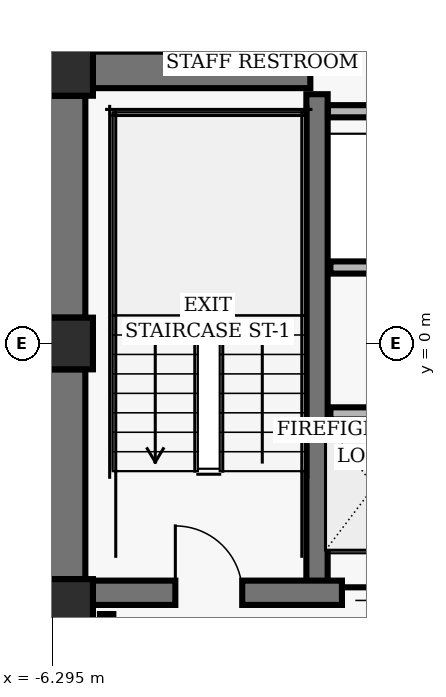
"""IFC4 building model, lengths in metres.
Left out: names, types, materials, properties, quantities, classifications, styles, units other than length and angle.
Written with IfcOpenShell. Run it as: python <this file> out.ifc"""

import sys

from ifc_helpers import new_model, si_unit, direction, frame, frame_2d, origin, origin_2d, place, context, subcontext, project, spatial, rectangle, hollow_rectangle, extrude, element, fill, save


model = new_model("IFC4")
c1 = context("Model", 3, precision=1e-05, world=origin(), true_north=direction((0.0, 1.0)))
c2 = subcontext(c1, "Body", "Model", "MODEL_VIEW")
j1 = project(units=[si_unit("LENGTHUNIT", "METRE"), si_unit("PLANEANGLEUNIT", "RADIAN")], contexts=[c1])
p1 = place(None, origin())
s1 = spatial("IfcSite", under=j1, at=p1, CompositionType="ELEMENT")
p2 = place(p1, origin())
s2 = spatial("IfcBuilding", under=s1, at=p2, CompositionType="ELEMENT")
p3 = place(p2, frame((0.0, 0.0, 116.8)))
s3 = spatial("IfcBuildingStorey", under=s2, at=p3, CompositionType="ELEMENT", Elevation=116.8)
for number, where, z_axis, x_axis in (
    (1, (-6.05, 4.5, 0.0), (0.0, 0.0, 1.0), (1.0, 0.0, 0.0)),
    (2, (-6.05, 0.0, 0.0), (0.0, 0.0, 1.0), (1.0, 0.0, 0.0)),
    (3, (-6.05, -4.3, 0.0), (0.0, 0.0, 1.0), (1.0, 0.0, 0.0)),
):
    element("IfcColumn", number, at=place(p3, frame(where, z_axis=z_axis, x_axis=x_axis)), inside=s3, PredefinedType="COLUMN", context=c2, shape_type="SweptSolid", body=[
        extrude(hollow_rectangle(XDim=0.85, YDim=0.85, WallThickness=0.055, InnerFilletRadius=0.02, OuterFilletRadius=0.04, at=origin_2d()), origin(), (0.0, 0.0, 1.0), 3.04),
    ])
p4 = place(p3, frame((-6.05, 0.425, 0.0), z_axis=(0.0, 0.0, 1.0), x_axis=(0.0, 1.0, 0.0)))
e4 = element("IfcWall", 4, at=p4, inside=s3, PredefinedType="SHEAR", context=c2, shape_type="SweptSolid", body=[
    extrude(rectangle(XDim=3.65, YDim=0.6, at=frame_2d((1.825, 0.0))), origin(), (0.0, 0.0, 1.0), 2.788),
])
p5 = place(p3, frame((-6.05, -3.875, 0.0), z_axis=(0.0, 0.0, 1.0), x_axis=(0.0, 1.0, 0.0)))
e5 = element("IfcWall", 5, at=p5, inside=s3, PredefinedType="SHEAR", context=c2, shape_type="SweptSolid", body=[
    extrude(rectangle(XDim=3.45, YDim=0.6, at=frame_2d((1.725, 0.0))), origin(), (0.0, 0.0, 1.0), 2.788),
])
p6 = place(p3, frame((-1.94, -4.1, 0.0), z_axis=(0.0, 0.0, 1.0), x_axis=(0.0, 1.0, 0.0)))
e6 = element("IfcWall", 6, at=p6, inside=s3, PredefinedType="SHEAR", context=c2, shape_type="SweptSolid", body=[
    extrude(rectangle(XDim=8.2, YDim=0.35, at=frame_2d((4.1, 0.0))), origin(), (0.0, 0.0, 1.0), 2.788),
])
p7 = place(p3, frame((-5.625, -4.1, 0.0), z_axis=(0.0, 0.0, 1.0), x_axis=(1.0, 0.0, 0.0)))
e7 = element("IfcWall", 7, at=p7, inside=s3, PredefinedType="SHEAR", context=c2, shape_type="SweptSolid", body=[
    extrude(rectangle(XDim=11.25, YDim=0.4, at=frame_2d((5.625, 0.0))), origin(), (0.0, 0.0, 1.0), 2.788),
])
p8 = place(p7, frame((1.355, 0.0, 0.0)))
e8 = element("IfcOpeningElement", 8, at=p8, cuts=e7, PredefinedType="OPENING", context=c2, shape_type="SweptSolid", body=[
    extrude(rectangle(XDim=1.1, YDim=2.04, at=frame_2d((0.55, 1.02))), frame((0.0, 0.21, 0.0), z_axis=(0.0, -1.0, 0.0), x_axis=(1.0, 0.0, 0.0)), (0.0, 0.0, 1.0), 0.42),
])
p9 = place(p7, frame((8.795, 0.0, 0.0)))
e9 = element("IfcOpeningElement", 9, at=p9, cuts=e7, PredefinedType="OPENING", context=c2, shape_type="SweptSolid", body=[
    extrude(rectangle(XDim=1.1, YDim=2.04, at=frame_2d((0.55, 1.02))), frame((0.0, 0.21, 0.0), z_axis=(0.0, -1.0, 0.0), x_axis=(1.0, 0.0, 0.0)), (0.0, 0.0, 1.0), 0.42),
])
p10 = place(p7, frame((4.095, 0.0, 0.0)))
e10 = element("IfcOpeningElement", 10, at=p10, cuts=e7, PredefinedType="OPENING", context=c2, shape_type="SweptSolid", body=[
    extrude(rectangle(XDim=1.06, YDim=2.04, at=frame_2d((0.53, 1.02))), frame((0.0, 0.21, 0.0), z_axis=(0.0, -1.0, 0.0), x_axis=(1.0, 0.0, 0.0)), (0.0, 0.0, 1.0), 0.42),
])
p11 = place(p7, frame((6.095, 0.0, 0.0)))
e11 = element("IfcOpeningElement", 11, at=p11, cuts=e7, PredefinedType="OPENING", context=c2, shape_type="SweptSolid", body=[
    extrude(rectangle(XDim=1.06, YDim=2.04, at=frame_2d((0.53, 1.02))), frame((0.0, 0.21, 0.0), z_axis=(0.0, -1.0, 0.0), x_axis=(1.0, 0.0, 0.0)), (0.0, 0.0, 1.0), 0.42),
])
p12 = place(p3, frame((-5.625, 4.5, 0.0), z_axis=(0.0, 0.0, 1.0), x_axis=(1.0, 0.0, 0.0)))
e12 = element("IfcWall", 12, at=p12, inside=s3, PredefinedType="SHEAR", context=c2, shape_type="SweptSolid", body=[
    extrude(rectangle(XDim=3.575, YDim=0.6, at=frame_2d((1.788, 0.0))), origin(), (0.0, 0.0, 1.0), 2.788),
])
p13 = place(p3, frame((-1.72, -1.15, 0.0), z_axis=(0.0, 0.0, 1.0), x_axis=(1.0, 0.0, 0.0)))
e13 = element("IfcWall", 13, at=p13, inside=s3, PredefinedType="PARTITIONING", context=c2, shape_type="SweptSolid", body=[
    extrude(rectangle(XDim=3.44, YDim=0.2, at=frame_2d((1.72, 0.0))), origin(), (0.0, 0.0, 1.0), 2.763),
])
p14 = place(p3, frame((-5.4, -7.16, 0.0), z_axis=(0.0, 0.0, 1.0), x_axis=(0.0, 1.0, 0.0)))
e14 = element("IfcWall", 14, at=p14, inside=s3, PredefinedType="PARTITIONING", context=c2, shape_type="SweptSolid", body=[
    extrude(rectangle(XDim=2.71, YDim=0.22, at=frame_2d((1.355, 0.0))), origin(), (0.0, 0.0, 1.0), 2.763),
])
p15 = place(p3, frame((-1.72, 1.25, 0.0), z_axis=(0.0, 0.0, 1.0), x_axis=(1.0, 0.0, 0.0)))
e15 = element("IfcWall", 15, at=p15, inside=s3, PredefinedType="PARTITIONING", context=c2, shape_type="SweptSolid", body=[
    extrude(rectangle(XDim=3.44, YDim=0.2, at=frame_2d((1.72, 0.0))), origin(), (0.0, 0.0, 1.0), 2.763),
])
p16 = place(p3, frame((-1.76, 3.82, 0.0), z_axis=(0.0, 0.0, 1.0), x_axis=(1.0, 0.0, 0.0)))
e16 = element("IfcWall", 16, at=p16, inside=s3, PredefinedType="PARTITIONING", context=c2, shape_type="SweptSolid", body=[
    extrude(rectangle(XDim=3.52, YDim=0.2, at=frame_2d((1.76, 0.0))), origin(), (0.0, 0.0, 1.0), 2.763),
])
p17 = place(p8, origin())
e17 = element("IfcDoor", 17, at=p17, inside=s3, OperationType="SINGLE_SWING_LEFT", PredefinedType="DOOR", context=c2, shape_type="SweptSolid", body=[
    extrude(rectangle(XDim=1.1, YDim=2.04, at=frame_2d((0.55, 1.02))), frame((0.0, 0.025, 0.0), z_axis=(0.0, -1.0, 0.0), x_axis=(1.0, 0.0, 0.0)), (0.0, 0.0, 1.0), 0.05),
])
fill(e8, e17)
p18 = place(p10, origin())
e18 = element("IfcDoor", 18, at=p18, inside=s3, OperationType="SLIDING_TO_LEFT", PredefinedType="DOOR", context=c2, shape_type="SweptSolid", body=[
    extrude(rectangle(XDim=1.06, YDim=2.04, at=frame_2d((0.53, 1.02))), frame((0.0, 0.025, 0.0), z_axis=(0.0, -1.0, 0.0), x_axis=(1.0, 0.0, 0.0)), (0.0, 0.0, 1.0), 0.05),
])
fill(e10, e18)
save(model, sys.argv[1])
